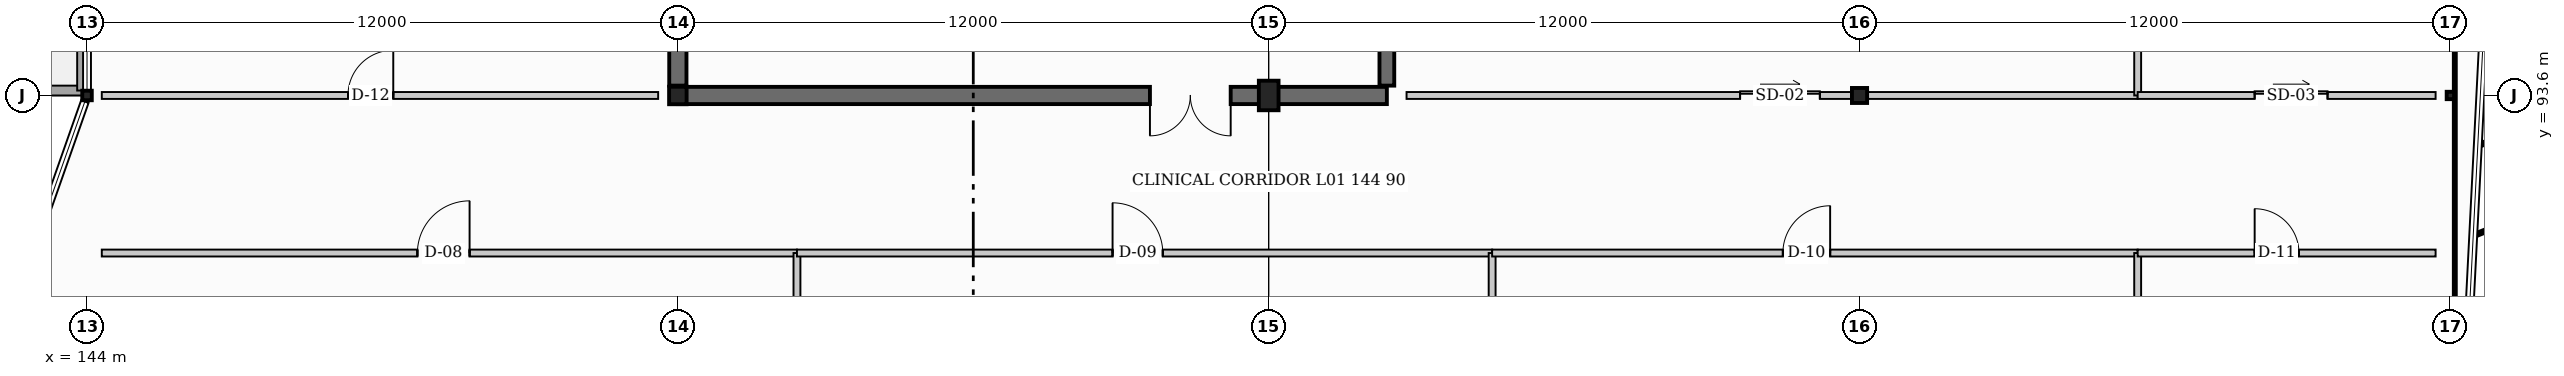
"""IFC4 building model, lengths in metres.
Left out: names, types, materials, properties, quantities, classifications, styles, units other than length and angle.
Written with IfcOpenShell. Run it as: python <this file> out.ifc"""

import sys

from ifc_helpers import new_model, si_unit, direction, frame, frame_2d, origin, origin_2d, place, context, subcontext, project, spatial, rectangle, hollow_rectangle, hollow_circle, i_section, extrude, element, fill, save


model = new_model("IFC4")
c1 = context("Model", 3, precision=1e-05, world=origin(), true_north=direction((0.0, 1.0)))
c2 = subcontext(c1, "Body", "Model", "MODEL_VIEW")
j1 = project(units=[si_unit("LENGTHUNIT", "METRE"), si_unit("PLANEANGLEUNIT", "RADIAN")], contexts=[c1])
p1 = place(None, origin())
s1 = spatial("IfcSite", under=j1, at=p1, CompositionType="ELEMENT")
p2 = place(p1, origin())
s2 = spatial("IfcBuilding", under=s1, at=p2, CompositionType="ELEMENT")
p3 = place(p2, frame((0.0, 0.0, 4.8)))
s3 = spatial("IfcBuildingStorey", under=s2, at=p3, CompositionType="ELEMENT", Elevation=4.8)
p4 = place(p3, frame((144.0, 93.6, 0.0), z_axis=(0.0, 0.0, 1.0), x_axis=(1.0, 0.0, 0.0)))
e1 = element("IfcColumn", 1, at=p4, inside=s3, PredefinedType="COLUMN", context=c2, shape_type="SweptSolid", body=[
    extrude(hollow_circle(Radius=0.097, WallThickness=0.008, at=origin_2d()), origin(), (0.0, 0.0, 1.0), 4.8),
])
p5 = place(p3, frame((156.0, 93.6, 0.0), z_axis=(0.0, 0.0, 1.0), x_axis=(0.0, 1.0, 0.0)))
e2 = element("IfcColumn", 2, at=p5, inside=s3, PredefinedType="COLUMN", context=c2, shape_type="SweptSolid", body=[
    extrude(hollow_circle(Radius=0.178, WallThickness=0.013, at=origin_2d()), origin(), (0.0, 0.0, 1.0), 4.8),
])
p6 = place(p3, frame((168.0, 93.6, 0.0), z_axis=(0.0, 0.0, 1.0), x_axis=(1.0, 0.0, 0.0)))
e3 = element("IfcColumn", 3, at=p6, inside=s3, PredefinedType="PILASTER", context=c2, shape_type="SweptSolid", body=[
    extrude(rectangle(XDim=0.4, YDim=0.6, at=origin_2d()), origin(), (0.0, 0.0, 1.0), 4.8),
])
p7 = place(p3, frame((180.0, 93.6, 0.0), z_axis=(0.0, 0.0, 1.0), x_axis=(0.0, 1.0, 0.0)))
e4 = element("IfcColumn", 4, at=p7, inside=s3, PredefinedType="COLUMN", context=c2, shape_type="SweptSolid", body=[
    extrude(i_section(OverallWidth=0.305, OverallDepth=0.308, WebThickness=0.01, FlangeThickness=0.015, at=origin_2d()), origin(), (0.0, 0.0, 1.0), 4.8),
])
p8 = place(p3, frame((192.0, 93.6, 0.0), z_axis=(0.0, 0.0, 1.0), x_axis=(1.0, 0.0, 0.0)))
e5 = element("IfcColumn", 5, at=p8, inside=s3, PredefinedType="COLUMN", context=c2, shape_type="SweptSolid", body=[
    extrude(hollow_rectangle(XDim=0.15, YDim=0.15, WallThickness=0.008, at=origin_2d()), origin(), (0.0, 0.0, 1.0), 4.8),
])
p9 = place(p3, frame((170.4, 93.6, 0.0), z_axis=(0.0, 0.0, 1.0), x_axis=(-1.0, 0.0, 0.0)))
e6 = element("IfcWall", 6, at=p9, inside=s3, PredefinedType="SHEAR", context=c2, shape_type="SweptSolid", body=[
    extrude(rectangle(XDim=14.4, YDim=0.35, at=frame_2d((7.2, 0.0))), origin(), (0.0, 0.0, 1.0), 4.8),
])
p10 = place(p9, frame((3.172, 0.0, 0.0)))
e7 = element("IfcOpeningElement", 7, at=p10, cuts=e6, PredefinedType="OPENING", context=c2, shape_type="SweptSolid", body=[
    extrude(rectangle(XDim=1.64, YDim=2.2, at=frame_2d((0.82, 1.1))), frame((0.0, 0.185, 0.0), z_axis=(0.0, -1.0, 0.0), x_axis=(1.0, 0.0, 0.0)), (0.0, 0.0, 1.0), 0.37),
])
p11 = place(p3, frame((156.0, 93.8, 0.0), z_axis=(0.0, 0.0, 1.0), x_axis=(0.0, 1.0, 0.0)))
e8 = element("IfcWall", 8, at=p11, inside=s3, PredefinedType="SHEAR", context=c2, shape_type="SweptSolid", body=[
    extrude(rectangle(XDim=8.0, YDim=0.35, at=frame_2d((4.0, 0.0))), origin(), (0.0, 0.0, 1.0), 4.8),
])
p12 = place(p3, frame((170.4, 101.8, 0.0), z_axis=(0.0, 0.0, 1.0), x_axis=(0.0, -1.0, 0.0)))
e9 = element("IfcWall", 9, at=p12, inside=s3, PredefinedType="SHEAR", context=c2, shape_type="SweptSolid", body=[
    extrude(rectangle(XDim=8.0, YDim=0.3, at=frame_2d((4.0, 0.0))), origin(), (0.0, 0.0, 1.0), 4.8),
])
p13 = place(p3, frame((143.9, 93.7, 0.31), z_axis=(0.0, 0.0, 1.0), x_axis=(-1.0, 0.0, 0.0)))
e10 = element("IfcWall", 10, at=p13, inside=s3, PredefinedType="PARAPET", context=c2, shape_type="SweptSolid", body=[
    extrude(rectangle(XDim=11.8, YDim=0.2, at=frame_2d((5.9, 0.0))), origin(), (0.0, 0.0, 1.0), 1.12),
])
p14 = place(p3, frame((143.9, 98.3, 0.31), z_axis=(0.0, 0.0, 1.0), x_axis=(0.0, -1.0, 0.0)))
e11 = element("IfcWall", 11, at=p14, inside=s3, PredefinedType="PARAPET", context=c2, shape_type="SweptSolid", body=[
    extrude(rectangle(XDim=4.6, YDim=0.2, at=frame_2d((2.3, 0.0))), origin(), (0.0, 0.0, 1.0), 1.12),
])
p15 = place(p3, frame((144.3, 90.4, 0.0), z_axis=(0.0, 0.0, 1.0), x_axis=(1.0, 0.0, 0.0)))
e12 = element("IfcWall", 12, at=p15, inside=s3, PredefinedType="PARTITIONING", context=c2, shape_type="SweptSolid", body=[
    extrude(rectangle(XDim=14.119, YDim=0.14, at=frame_2d((7.06, 0.0))), origin(), (0.0, 0.0, 1.0), 3.973),
])
p16 = place(p15, frame((6.41, 0.0, 0.0)))
e13 = element("IfcOpeningElement", 13, at=p16, cuts=e12, PredefinedType="OPENING", context=c2, shape_type="SweptSolid", body=[
    extrude(rectangle(XDim=1.06, YDim=2.1, at=frame_2d((0.53, 1.05))), frame((0.0, 0.08, 0.0), z_axis=(0.0, -1.0, 0.0), x_axis=(1.0, 0.0, 0.0)), (0.0, 0.0, 1.0), 0.16),
])
p17 = place(p3, frame((158.419, 81.9, 0.0), z_axis=(0.0, 0.0, 1.0), x_axis=(0.0, 1.0, 0.0)))
e14 = element("IfcWall", 14, at=p17, inside=s3, PredefinedType="PARTITIONING", context=c2, shape_type="SweptSolid", body=[
    extrude(rectangle(XDim=8.5, YDim=0.14, at=frame_2d((4.25, 0.0))), origin(), (0.0, 0.0, 1.0), 3.902),
])
p18 = place(p3, frame((158.419, 90.4, 0.0), z_axis=(0.0, 0.0, 1.0), x_axis=(1.0, 0.0, 0.0)))
e15 = element("IfcWall", 15, at=p18, inside=s3, PredefinedType="PARTITIONING", context=c2, shape_type="SweptSolid", body=[
    extrude(rectangle(XDim=14.119, YDim=0.14, at=frame_2d((7.06, 0.0))), origin(), (0.0, 0.0, 1.0), 3.48),
])
p19 = place(p18, frame((6.41, 0.0, 0.0)))
e16 = element("IfcOpeningElement", 16, at=p19, cuts=e15, PredefinedType="OPENING", context=c2, shape_type="SweptSolid", body=[
    extrude(rectangle(XDim=1.02, YDim=2.08, at=frame_2d((0.51, 1.04))), frame((0.0, 0.08, 0.0), z_axis=(0.0, -1.0, 0.0), x_axis=(1.0, 0.0, 0.0)), (0.0, 0.0, 1.0), 0.16),
])
p20 = place(p3, frame((172.538, 81.9, 0.0), z_axis=(0.0, 0.0, 1.0), x_axis=(0.0, 1.0, 0.0)))
e17 = element("IfcWall", 17, at=p20, inside=s3, PredefinedType="PARTITIONING", context=c2, shape_type="SweptSolid", body=[
    extrude(rectangle(XDim=8.5, YDim=0.14, at=frame_2d((4.25, 0.0))), origin(), (0.0, 0.0, 1.0), 3.97),
])
p21 = place(p3, frame((172.538, 90.4, 0.0), z_axis=(0.0, 0.0, 1.0), x_axis=(1.0, 0.0, 0.0)))
e18 = element("IfcWall", 18, at=p21, inside=s3, PredefinedType="PARTITIONING", context=c2, shape_type="SweptSolid", body=[
    extrude(rectangle(XDim=13.111, YDim=0.14, at=frame_2d((6.555, 0.0))), origin(), (0.0, 0.0, 1.0), 3.53),
])
p22 = place(p21, frame((5.905, 0.0, 0.0)))
e19 = element("IfcOpeningElement", 19, at=p22, cuts=e18, PredefinedType="OPENING", context=c2, shape_type="SweptSolid", body=[
    extrude(rectangle(XDim=0.96, YDim=2.06, at=frame_2d((0.48, 1.03))), frame((0.0, 0.08, 0.0), z_axis=(0.0, -1.0, 0.0), x_axis=(1.0, 0.0, 0.0)), (0.0, 0.0, 1.0), 0.16),
])
p23 = place(p3, frame((185.649, 81.9, 0.0), z_axis=(0.0, 0.0, 1.0), x_axis=(0.0, 1.0, 0.0)))
e20 = element("IfcWall", 20, at=p23, inside=s3, PredefinedType="PARTITIONING", context=c2, shape_type="SweptSolid", body=[
    extrude(rectangle(XDim=8.5, YDim=0.14, at=frame_2d((4.25, 0.0))), origin(), (0.0, 0.0, 1.0), 3.973),
])
p24 = place(p3, frame((185.649, 90.4, 0.0), z_axis=(0.0, 0.0, 1.0), x_axis=(1.0, 0.0, 0.0)))
e21 = element("IfcWall", 21, at=p24, inside=s3, PredefinedType="PARTITIONING", context=c2, shape_type="SweptSolid", body=[
    extrude(rectangle(XDim=6.051, YDim=0.14, at=frame_2d((3.025, 0.0))), origin(), (0.0, 0.0, 1.0), 4.18),
])
p25 = place(p24, frame((2.376, 0.0, 0.0)))
e22 = element("IfcOpeningElement", 22, at=p25, cuts=e21, PredefinedType="OPENING", context=c2, shape_type="SweptSolid", body=[
    extrude(rectangle(XDim=0.9, YDim=2.1, at=frame_2d((0.45, 1.05))), frame((0.0, 0.08, 0.0), z_axis=(0.0, -1.0, 0.0), x_axis=(1.0, 0.0, 0.0)), (0.0, 0.0, 1.0), 0.16),
])
p26 = place(p3, frame((144.3, 93.6, 0.0), z_axis=(0.0, 0.0, 1.0), x_axis=(1.0, 0.0, 0.0)))
e23 = element("IfcWall", 23, at=p26, inside=s3, PredefinedType="PARTITIONING", context=c2, shape_type="SweptSolid", body=[
    extrude(rectangle(XDim=11.3, YDim=0.14, at=frame_2d((5.65, 0.0))), origin(), (0.0, 0.0, 1.0), 3.897),
])
p27 = place(p26, frame((5.0, 0.0, 0.0)))
e24 = element("IfcOpeningElement", 24, at=p27, cuts=e23, PredefinedType="OPENING", context=c2, shape_type="SweptSolid", body=[
    extrude(rectangle(XDim=0.92, YDim=2.04, at=frame_2d((0.46, 1.02))), frame((0.0, 0.08, 0.0), z_axis=(0.0, -1.0, 0.0), x_axis=(1.0, 0.0, 0.0)), (0.0, 0.0, 1.0), 0.16),
])
p28 = place(p3, frame((170.8, 93.6, 0.0), z_axis=(0.0, 0.0, 1.0), x_axis=(1.0, 0.0, 0.0)))
e25 = element("IfcWall", 25, at=p28, inside=s3, PredefinedType="PARTITIONING", context=c2, shape_type="SweptSolid", body=[
    extrude(rectangle(XDim=14.849, YDim=0.14, at=frame_2d((7.424, 0.0))), origin(), (0.0, 0.0, 1.0), 3.53),
])
p29 = place(p28, frame((6.774, 0.0, 0.0)))
e26 = element("IfcOpeningElement", 26, at=p29, cuts=e25, PredefinedType="OPENING", context=c2, shape_type="SweptSolid", body=[
    extrude(rectangle(XDim=1.62, YDim=2.3, at=frame_2d((0.81, 1.15))), frame((0.0, 0.08, 0.0), z_axis=(0.0, -1.0, 0.0), x_axis=(1.0, 0.0, 0.0)), (0.0, 0.0, 1.0), 0.16),
])
p30 = place(p3, frame((185.649, 93.6, 0.0), z_axis=(0.0, 0.0, 1.0), x_axis=(0.0, 1.0, 0.0)))
e27 = element("IfcWall", 27, at=p30, inside=s3, PredefinedType="PARTITIONING", context=c2, shape_type="SweptSolid", body=[
    extrude(rectangle(XDim=32.1, YDim=0.14, at=frame_2d((16.05, 0.0))), origin(), (0.0, 0.0, 1.0), 3.48),
])
p31 = place(p3, frame((185.649, 93.6, 0.0), z_axis=(0.0, 0.0, 1.0), x_axis=(1.0, 0.0, 0.0)))
e28 = element("IfcWall", 28, at=p31, inside=s3, PredefinedType="PARTITIONING", context=c2, shape_type="SweptSolid", body=[
    extrude(rectangle(XDim=6.051, YDim=0.14, at=frame_2d((3.025, 0.0))), origin(), (0.0, 0.0, 1.0), 3.976),
])
p32 = place(p31, frame((2.376, 0.0, 0.0)))
e29 = element("IfcOpeningElement", 29, at=p32, cuts=e28, PredefinedType="OPENING", context=c2, shape_type="SweptSolid", body=[
    extrude(rectangle(XDim=1.48, YDim=2.26, at=frame_2d((0.74, 1.13))), frame((0.0, 0.08, 0.0), z_axis=(0.0, -1.0, 0.0), x_axis=(1.0, 0.0, 0.0)), (0.0, 0.0, 1.0), 0.16),
])
p33 = place(p10, origin())
e30 = element("IfcDoor", 30, at=p33, inside=s3, OperationType="DOUBLE_DOOR_SINGLE_SWING", PredefinedType="DOOR", context=c2, shape_type="SweptSolid", body=[
    extrude(rectangle(XDim=1.64, YDim=2.2, at=frame_2d((0.82, 1.1))), frame((0.0, 0.025, 0.0), z_axis=(0.0, -1.0, 0.0), x_axis=(1.0, 0.0, 0.0)), (0.0, 0.0, 1.0), 0.05),
])
fill(e7, e30)
p34 = place(p16, origin())
e31 = element("IfcDoor", 31, at=p34, inside=s3, OperationType="SINGLE_SWING_RIGHT", PredefinedType="DOOR", context=c2, shape_type="SweptSolid", body=[
    extrude(rectangle(XDim=1.06, YDim=2.1, at=frame_2d((0.53, 1.05))), frame((0.0, 0.025, 0.0), z_axis=(0.0, -1.0, 0.0), x_axis=(1.0, 0.0, 0.0)), (0.0, 0.0, 1.0), 0.05),
])
fill(e13, e31)
p35 = place(p19, origin())
e32 = element("IfcDoor", 32, at=p35, inside=s3, OperationType="SINGLE_SWING_LEFT", PredefinedType="DOOR", context=c2, shape_type="SweptSolid", body=[
    extrude(rectangle(XDim=1.02, YDim=2.08, at=frame_2d((0.51, 1.04))), frame((0.0, 0.025, 0.0), z_axis=(0.0, -1.0, 0.0), x_axis=(1.0, 0.0, 0.0)), (0.0, 0.0, 1.0), 0.05),
])
fill(e16, e32)
p36 = place(p22, origin())
e33 = element("IfcDoor", 33, at=p36, inside=s3, OperationType="SINGLE_SWING_RIGHT", PredefinedType="DOOR", context=c2, shape_type="SweptSolid", body=[
    extrude(rectangle(XDim=0.96, YDim=2.06, at=frame_2d((0.48, 1.03))), frame((0.0, 0.025, 0.0), z_axis=(0.0, -1.0, 0.0), x_axis=(1.0, 0.0, 0.0)), (0.0, 0.0, 1.0), 0.05),
])
fill(e19, e33)
p37 = place(p25, origin())
e34 = element("IfcDoor", 34, at=p37, inside=s3, OperationType="SINGLE_SWING_LEFT", PredefinedType="DOOR", context=c2, shape_type="SweptSolid", body=[
    extrude(rectangle(XDim=0.9, YDim=2.1, at=frame_2d((0.45, 1.05))), frame((0.0, 0.025, 0.0), z_axis=(0.0, -1.0, 0.0), x_axis=(1.0, 0.0, 0.0)), (0.0, 0.0, 1.0), 0.05),
])
fill(e22, e34)
p38 = place(p27, origin())
e35 = element("IfcDoor", 35, at=p38, inside=s3, OperationType="SINGLE_SWING_RIGHT", PredefinedType="DOOR", context=c2, shape_type="SweptSolid", body=[
    extrude(rectangle(XDim=0.92, YDim=2.04, at=frame_2d((0.46, 1.02))), frame((0.0, 0.025, 0.0), z_axis=(0.0, -1.0, 0.0), x_axis=(1.0, 0.0, 0.0)), (0.0, 0.0, 1.0), 0.05),
])
fill(e24, e35)
p39 = place(p29, origin())
e36 = element("IfcDoor", 36, at=p39, inside=s3, OperationType="SLIDING_TO_RIGHT", PredefinedType="DOOR", context=c2, shape_type="SweptSolid", body=[
    extrude(rectangle(XDim=1.62, YDim=2.3, at=frame_2d((0.81, 1.15))), frame((0.0, 0.025, 0.0), z_axis=(0.0, -1.0, 0.0), x_axis=(1.0, 0.0, 0.0)), (0.0, 0.0, 1.0), 0.05),
])
fill(e26, e36)
p40 = place(p32, origin())
e37 = element("IfcDoor", 37, at=p40, inside=s3, OperationType="SLIDING_TO_LEFT", PredefinedType="DOOR", context=c2, shape_type="SweptSolid", body=[
    extrude(rectangle(XDim=1.48, YDim=2.26, at=frame_2d((0.74, 1.13))), frame((0.0, 0.025, 0.0), z_axis=(0.0, -1.0, 0.0), x_axis=(1.0, 0.0, 0.0)), (0.0, 0.0, 1.0), 0.05),
])
fill(e29, e37)
save(model, sys.argv[1])
